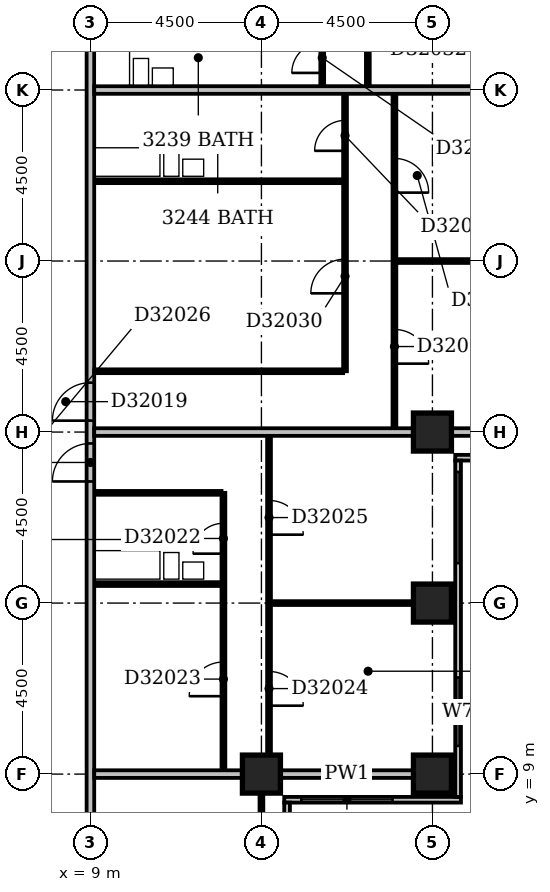
"""IFC4 building model, lengths in metres.
Left out: names, types, materials, properties, quantities, classifications, styles, units other than length and angle.
Written with IfcOpenShell. Run it as: python <this file> out.ifc"""

import sys

from ifc_helpers import new_model, si_unit, direction, frame, frame_2d, origin, origin_2d, place, context, subcontext, project, spatial, rectangle, extrude, element, fill, save


model = new_model("IFC4")
c1 = context("Model", 3, precision=1e-05, world=origin(), true_north=direction((0.0, 1.0)))
c2 = subcontext(c1, "Body", "Model", "MODEL_VIEW")
j1 = project(units=[si_unit("LENGTHUNIT", "METRE"), si_unit("PLANEANGLEUNIT", "RADIAN")], contexts=[c1])
p1 = place(None, origin())
s1 = spatial("IfcSite", under=j1, at=p1, CompositionType="ELEMENT")
p2 = place(p1, origin())
s2 = spatial("IfcBuilding", under=s1, at=p2, CompositionType="ELEMENT")
p3 = place(p2, frame((0.0, 0.0, 130.4)))
s3 = spatial("IfcBuildingStorey", under=s2, at=p3, CompositionType="ELEMENT", Elevation=130.4)
for number, where, z_axis, x_axis in (
    (1, (13.5, 9.0, -0.3), (0.0, 0.0, 1.0), (1.0, 0.0, 0.0)),
    (2, (18.0, 9.0, -0.3), (0.0, 0.0, 1.0), (1.0, 0.0, 0.0)),
    (3, (18.0, 13.5, -0.3), (0.0, 0.0, 1.0), (1.0, 0.0, 0.0)),
    (4, (18.0, 18.0, -0.3), (0.0, 0.0, 1.0), (1.0, 0.0, 0.0)),
):
    element("IfcColumn", number, at=place(p3, frame(where, z_axis=z_axis, x_axis=x_axis)), inside=s3, PredefinedType="COLUMN", context=c2, shape_type="SweptSolid", body=[
        extrude(rectangle(XDim=1.0, YDim=1.0, at=origin_2d()), origin(), (0.0, 0.0, 1.0), 3.6),
    ])
p4 = place(p3, frame((14.175, 3.9, 0.0), z_axis=(0.0, 0.0, 1.0), x_axis=(0.0, 1.0, 0.0)))
e5 = element("IfcWall", 5, at=p4, inside=s3, PredefinedType="STANDARD", context=c2, shape_type="SweptSolid", body=[
    extrude(rectangle(XDim=4.35, YDim=0.15, at=frame_2d((2.175, 0.0))), origin(), (0.0, 0.0, 1.0), 2.7),
])
p5 = place(p4, frame((1.65, 0.0, 0.6)))
e6 = element("IfcOpeningElement", 6, at=p5, cuts=e5, PredefinedType="OPENING", context=c2, shape_type="SweptSolid", body=[
    extrude(rectangle(XDim=2.4, YDim=1.8, at=frame_2d((1.2, 0.9))), frame((0.0, 0.087, 0.0), z_axis=(0.0, -1.0, 0.0), x_axis=(1.0, 0.0, 0.0)), (0.0, 0.0, 1.0), 0.174),
])
p6 = place(p3, frame((14.1, 8.325, 0.0), z_axis=(0.0, 0.0, 1.0), x_axis=(1.0, 0.0, 0.0)))
e7 = element("IfcWall", 7, at=p6, inside=s3, PredefinedType="STANDARD", context=c2, shape_type="SweptSolid", body=[
    extrude(rectangle(XDim=4.65, YDim=0.15, at=frame_2d((2.325, 0.0))), origin(), (0.0, 0.0, 1.0), 2.7),
])
p7 = place(p6, frame((0.45, 0.0, 0.6)))
e8 = element("IfcOpeningElement", 8, at=p7, cuts=e7, PredefinedType="OPENING", context=c2, shape_type="SweptSolid", body=[
    extrude(rectangle(XDim=2.4, YDim=1.8, at=frame_2d((1.2, 0.9))), frame((0.0, 0.087, 0.0), z_axis=(0.0, -1.0, 0.0), x_axis=(1.0, 0.0, 0.0)), (0.0, 0.0, 1.0), 0.174),
])
p8 = place(p3, frame((18.675, 8.4, 0.0), z_axis=(0.0, 0.0, 1.0), x_axis=(0.0, 1.0, 0.0)))
e9 = element("IfcWall", 9, at=p8, inside=s3, PredefinedType="STANDARD", context=c2, shape_type="SweptSolid", body=[
    extrude(rectangle(XDim=8.85, YDim=0.15, at=frame_2d((4.425, 0.0))), origin(), (0.0, 0.0, 1.0), 2.7),
])
p9 = place(p8, frame((1.342, 0.0, 0.6)))
e10 = element("IfcOpeningElement", 10, at=p9, cuts=e9, PredefinedType="OPENING", context=c2, shape_type="SweptSolid", body=[
    extrude(rectangle(XDim=1.8, YDim=1.8, at=frame_2d((0.9, 0.9))), frame((0.0, 0.087, 0.0), z_axis=(0.0, -1.0, 0.0), x_axis=(1.0, 0.0, 0.0)), (0.0, 0.0, 1.0), 0.174),
])
p10 = place(p8, frame((6.15, 0.0, 0.6)))
e11 = element("IfcOpeningElement", 11, at=p10, cuts=e9, PredefinedType="OPENING", context=c2, shape_type="SweptSolid", body=[
    extrude(rectangle(XDim=2.4, YDim=1.8, at=frame_2d((1.2, 0.9))), frame((0.0, 0.087, 0.0), z_axis=(0.0, -1.0, 0.0), x_axis=(1.0, 0.0, 0.0)), (0.0, 0.0, 1.0), 0.174),
])
p11 = place(p3, frame((18.6, 17.325, 0.0), z_axis=(0.0, 0.0, 1.0), x_axis=(1.0, 0.0, 0.0)))
e12 = element("IfcWall", 12, at=p11, inside=s3, PredefinedType="STANDARD", context=c2, shape_type="SweptSolid", body=[
    extrude(rectangle(XDim=4.65, YDim=0.15, at=frame_2d((2.325, 0.0))), origin(), (0.0, 0.0, 1.0), 2.7),
])
p12 = place(p11, frame((0.45, 0.0, 0.6)))
e13 = element("IfcOpeningElement", 13, at=p12, cuts=e12, PredefinedType="OPENING", context=c2, shape_type="SweptSolid", body=[
    extrude(rectangle(XDim=2.4, YDim=1.8, at=frame_2d((1.2, 0.9))), frame((0.0, 0.087, 0.0), z_axis=(0.0, -1.0, 0.0), x_axis=(1.0, 0.0, 0.0)), (0.0, 0.0, 1.0), 0.174),
])
p13 = place(p3, frame((9.0, 5.0, 0.0), z_axis=(0.0, 0.0, 1.0), x_axis=(0.0, 1.0, 0.0)))
e14 = element("IfcWall", 14, at=p13, inside=s3, PredefinedType="PARTITIONING", context=c2, shape_type="SweptSolid", body=[
    extrude(rectangle(XDim=27.75, YDim=0.2, at=frame_2d((13.875, 0.0))), origin(), (0.0, 0.0, 1.0), 3.3),
])
p14 = place(p13, frame((23.95, 0.0, 0.0)))
e15 = element("IfcOpeningElement", 15, at=p14, cuts=e14, PredefinedType="OPENING", context=c2, shape_type="SweptSolid", body=[
    extrude(rectangle(XDim=1.0, YDim=2.1, at=frame_2d((0.5, 1.05))), frame((0.0, 0.112, 0.0), z_axis=(0.0, -1.0, 0.0), x_axis=(1.0, 0.0, 0.0)), (0.0, 0.0, 1.0), 0.224),
])
p15 = place(p13, frame((13.3, 0.0, 0.0)))
e16 = element("IfcOpeningElement", 16, at=p15, cuts=e14, PredefinedType="OPENING", context=c2, shape_type="SweptSolid", body=[
    extrude(rectangle(XDim=1.0, YDim=2.1, at=frame_2d((0.5, 1.05))), frame((0.0, 0.112, 0.0), z_axis=(0.0, -1.0, 0.0), x_axis=(1.0, 0.0, 0.0)), (0.0, 0.0, 1.0), 0.224),
])
p16 = place(p13, frame((11.7, 0.0, 0.0)))
e17 = element("IfcOpeningElement", 17, at=p16, cuts=e14, PredefinedType="OPENING", context=c2, shape_type="SweptSolid", body=[
    extrude(rectangle(XDim=1.0, YDim=2.1, at=frame_2d((0.5, 1.05))), frame((0.0, 0.112, 0.0), z_axis=(0.0, -1.0, 0.0), x_axis=(1.0, 0.0, 0.0)), (0.0, 0.0, 1.0), 0.224),
])
p17 = place(p13, frame((1.5, 0.0, 0.0)))
e18 = element("IfcOpeningElement", 18, at=p17, cuts=e14, PredefinedType="OPENING", context=c2, shape_type="SweptSolid", body=[
    extrude(rectangle(XDim=0.9, YDim=2.1, at=frame_2d((0.45, 1.05))), frame((0.0, 0.112, 0.0), z_axis=(0.0, -1.0, 0.0), x_axis=(1.0, 0.0, 0.0)), (0.0, 0.0, 1.0), 0.224),
])
p18 = place(p3, frame((13.5, 5.0, 0.0), z_axis=(0.0, 0.0, 1.0), x_axis=(0.0, 1.0, 0.0)))
e19 = element("IfcWall", 19, at=p18, inside=s3, PredefinedType="PARTITIONING", context=c2, shape_type="SweptSolid", body=[
    extrude(rectangle(XDim=3.5, YDim=0.1, at=frame_2d((1.75, 0.0))), origin(), (0.0, 0.0, 1.0), 2.7),
])
p19 = place(p3, frame((9.1, 9.0, 0.0), z_axis=(0.0, 0.0, 1.0), x_axis=(1.0, 0.0, 0.0)))
e20 = element("IfcWall", 20, at=p19, inside=s3, PredefinedType="PARTITIONING", context=c2, shape_type="SweptSolid", body=[
    extrude(rectangle(XDim=3.9, YDim=0.2, at=frame_2d((1.95, 0.0))), origin(), (0.0, 0.0, 1.0), 3.3),
])
p20 = place(p3, frame((14.0, 9.0, 0.0), z_axis=(0.0, 0.0, 1.0), x_axis=(1.0, 0.0, 0.0)))
e21 = element("IfcWall", 21, at=p20, inside=s3, PredefinedType="PARTITIONING", context=c2, shape_type="SweptSolid", body=[
    extrude(rectangle(XDim=3.5, YDim=0.2, at=frame_2d((1.75, 0.0))), origin(), (0.0, 0.0, 1.0), 2.7),
])
p21 = place(p3, frame((12.5, 9.1, 0.0), z_axis=(0.0, 0.0, 1.0), x_axis=(0.0, 1.0, 0.0)))
e22 = element("IfcWall", 22, at=p21, inside=s3, PredefinedType="PARTITIONING", context=c2, shape_type="SweptSolid", body=[
    extrude(rectangle(XDim=7.3, YDim=0.1, at=frame_2d((3.65, 0.0))), origin(), (0.0, 0.0, 1.0), 3.3),
])
p22 = place(p21, frame((5.7, 0.0, 0.0)))
e23 = element("IfcOpeningElement", 23, at=p22, cuts=e22, PredefinedType="OPENING", context=c2, shape_type="SweptSolid", body=[
    extrude(rectangle(XDim=0.8, YDim=2.1, at=frame_2d((0.4, 1.05))), frame((0.0, 0.062, 0.0), z_axis=(0.0, -1.0, 0.0), x_axis=(1.0, 0.0, 0.0)), (0.0, 0.0, 1.0), 0.124),
])
p23 = place(p21, frame((1.95, 0.0, 0.0)))
e24 = element("IfcOpeningElement", 24, at=p23, cuts=e22, PredefinedType="OPENING", context=c2, shape_type="SweptSolid", body=[
    extrude(rectangle(XDim=0.9, YDim=2.1, at=frame_2d((0.45, 1.05))), frame((0.0, 0.062, 0.0), z_axis=(0.0, -1.0, 0.0), x_axis=(1.0, 0.0, 0.0)), (0.0, 0.0, 1.0), 0.124),
])
p24 = place(p3, frame((13.7, 9.5, 0.0), z_axis=(0.0, 0.0, 1.0), x_axis=(0.0, 1.0, 0.0)))
e25 = element("IfcWall", 25, at=p24, inside=s3, PredefinedType="PARTITIONING", context=c2, shape_type="SweptSolid", body=[
    extrude(rectangle(XDim=8.4, YDim=0.1, at=frame_2d((4.2, 0.0))), origin(), (0.0, 0.0, 1.0), 3.3),
])
p25 = place(p24, frame((1.3, 0.0, 0.0)))
e26 = element("IfcOpeningElement", 26, at=p25, cuts=e25, PredefinedType="OPENING", context=c2, shape_type="SweptSolid", body=[
    extrude(rectangle(XDim=0.9, YDim=2.1, at=frame_2d((0.45, 1.05))), frame((0.0, 0.062, 0.0), z_axis=(0.0, -1.0, 0.0), x_axis=(1.0, 0.0, 0.0)), (0.0, 0.0, 1.0), 0.124),
])
p26 = place(p24, frame((5.8, 0.0, 0.0)))
e27 = element("IfcOpeningElement", 27, at=p26, cuts=e25, PredefinedType="OPENING", context=c2, shape_type="SweptSolid", body=[
    extrude(rectangle(XDim=0.9, YDim=2.1, at=frame_2d((0.45, 1.05))), frame((0.0, 0.062, 0.0), z_axis=(0.0, -1.0, 0.0), x_axis=(1.0, 0.0, 0.0)), (0.0, 0.0, 1.0), 0.124),
])
p27 = place(p3, frame((13.75, 13.5, 0.0), z_axis=(0.0, 0.0, 1.0), x_axis=(1.0, 0.0, 0.0)))
e28 = element("IfcWall", 28, at=p27, inside=s3, PredefinedType="PARTITIONING", context=c2, shape_type="SweptSolid", body=[
    extrude(rectangle(XDim=3.75, YDim=0.1, at=frame_2d((1.875, 0.0))), origin(), (0.0, 0.0, 1.0), 3.3),
])
for number, where, z_axis, x_axis in (
    (29, (9.1, 14.0, 0.0), (0.0, 0.0, 1.0), (1.0, 0.0, 0.0)),
    (30, (9.1, 16.4, 0.0), (0.0, 0.0, 1.0), (1.0, 0.0, 0.0)),
):
    element("IfcWall", number, at=place(p3, frame(where, z_axis=z_axis, x_axis=x_axis)), inside=s3, PredefinedType="PLUMBINGWALL", context=c2, shape_type="SweptSolid", body=[
        extrude(rectangle(XDim=3.35, YDim=0.1, at=frame_2d((1.675, 0.0))), origin(), (0.0, 0.0, 1.0), 3.3),
    ])
p28 = place(p3, frame((9.1, 18.0, 0.0), z_axis=(0.0, 0.0, 1.0), x_axis=(1.0, 0.0, 0.0)))
e31 = element("IfcWall", 31, at=p28, inside=s3, PredefinedType="PARTITIONING", context=c2, shape_type="SweptSolid", body=[
    extrude(rectangle(XDim=8.4, YDim=0.2, at=frame_2d((4.2, 0.0))), origin(), (0.0, 0.0, 1.0), 2.6),
])
p29 = place(p3, frame((18.5, 18.0, 0.0), z_axis=(0.0, 0.0, 1.0), x_axis=(1.0, 0.0, 0.0)))
e32 = element("IfcWall", 32, at=p29, inside=s3, PredefinedType="PARTITIONING", context=c2, shape_type="SweptSolid", body=[
    extrude(rectangle(XDim=3.5, YDim=0.2, at=frame_2d((1.75, 0.0))), origin(), (0.0, 0.0, 1.0), 2.7),
])
p30 = place(p3, frame((17.0, 18.1, 0.0), z_axis=(0.0, 0.0, 1.0), x_axis=(0.0, 1.0, 0.0)))
e33 = element("IfcWall", 33, at=p30, inside=s3, PredefinedType="PARTITIONING", context=c2, shape_type="SweptSolid", body=[
    extrude(rectangle(XDim=8.8, YDim=0.1, at=frame_2d((4.4, 0.0))), origin(), (0.0, 0.0, 1.0), 3.3),
])
p31 = place(p30, frame((1.7, 0.0, 0.0)))
e34 = element("IfcOpeningElement", 34, at=p31, cuts=e33, PredefinedType="OPENING", context=c2, shape_type="SweptSolid", body=[
    extrude(rectangle(XDim=0.9, YDim=2.1, at=frame_2d((0.45, 1.05))), frame((0.0, 0.062, 0.0), z_axis=(0.0, -1.0, 0.0), x_axis=(1.0, 0.0, 0.0)), (0.0, 0.0, 1.0), 0.124),
])
p32 = place(p30, frame((6.2, 0.0, 0.0)))
e35 = element("IfcOpeningElement", 35, at=p32, cuts=e33, PredefinedType="OPENING", context=c2, shape_type="SweptSolid", body=[
    extrude(rectangle(XDim=0.9, YDim=2.1, at=frame_2d((0.45, 1.05))), frame((0.0, 0.062, 0.0), z_axis=(0.0, -1.0, 0.0), x_axis=(1.0, 0.0, 0.0)), (0.0, 0.0, 1.0), 0.124),
])
p33 = place(p3, frame((9.1, 19.6, 0.0), z_axis=(0.0, 0.0, 1.0), x_axis=(1.0, 0.0, 0.0)))
e36 = element("IfcWall", 36, at=p33, inside=s3, PredefinedType="PARTITIONING", context=c2, shape_type="SweptSolid", body=[
    extrude(rectangle(XDim=6.55, YDim=0.1, at=frame_2d((3.275, 0.0))), origin(), (0.0, 0.0, 1.0), 3.3),
])
p34 = place(p3, frame((15.7, 19.6, 0.0), z_axis=(0.0, 0.0, 1.0), x_axis=(0.0, 1.0, 0.0)))
e37 = element("IfcWall", 37, at=p34, inside=s3, PredefinedType="PARTITIONING", context=c2, shape_type="SweptSolid", body=[
    extrude(rectangle(XDim=7.3, YDim=0.1, at=frame_2d((3.65, 0.0))), origin(), (0.0, 0.0, 1.0), 3.3),
])
p35 = place(p34, frame((5.8, 0.0, 0.0)))
e38 = element("IfcOpeningElement", 38, at=p35, cuts=e37, PredefinedType="OPENING", context=c2, shape_type="SweptSolid", body=[
    extrude(rectangle(XDim=0.8, YDim=2.1, at=frame_2d((0.4, 1.05))), frame((0.0, 0.062, 0.0), z_axis=(0.0, -1.0, 0.0), x_axis=(1.0, 0.0, 0.0)), (0.0, 0.0, 1.0), 0.124),
])
p36 = place(p34, frame((2.05, 0.0, 0.0)))
e39 = element("IfcOpeningElement", 39, at=p36, cuts=e37, PredefinedType="OPENING", context=c2, shape_type="SweptSolid", body=[
    extrude(rectangle(XDim=0.9, YDim=2.1, at=frame_2d((0.45, 1.05))), frame((0.0, 0.062, 0.0), z_axis=(0.0, -1.0, 0.0), x_axis=(1.0, 0.0, 0.0)), (0.0, 0.0, 1.0), 0.124),
])
p37 = place(p3, frame((17.05, 22.5, 0.0), z_axis=(0.0, 0.0, 1.0), x_axis=(1.0, 0.0, 0.0)))
e40 = element("IfcWall", 40, at=p37, inside=s3, PredefinedType="PARTITIONING", context=c2, shape_type="SweptSolid", body=[
    extrude(rectangle(XDim=4.95, YDim=0.1, at=frame_2d((2.475, 0.0))), origin(), (0.0, 0.0, 1.0), 3.3),
])
p38 = place(p3, frame((9.1, 24.6, 0.0), z_axis=(0.0, 0.0, 1.0), x_axis=(1.0, 0.0, 0.0)))
e41 = element("IfcWall", 41, at=p38, inside=s3, PredefinedType="PLUMBINGWALL", context=c2, shape_type="SweptSolid", body=[
    extrude(rectangle(XDim=6.55, YDim=0.1, at=frame_2d((3.275, 0.0))), origin(), (0.0, 0.0, 1.0), 3.3),
])
p39 = place(p3, frame((9.1, 27.0, 0.0), z_axis=(0.0, 0.0, 1.0), x_axis=(1.0, 0.0, 0.0)))
e42 = element("IfcWall", 42, at=p39, inside=s3, PredefinedType="PARTITIONING", context=c2, shape_type="SweptSolid", body=[
    extrude(rectangle(XDim=12.9, YDim=0.2, at=frame_2d((6.45, 0.0))), origin(), (0.0, 0.0, 1.0), 2.7),
])
p40 = place(p3, frame((15.1, 27.1, 0.0), z_axis=(0.0, 0.0, 1.0), x_axis=(0.0, 1.0, 0.0)))
e43 = element("IfcWall", 43, at=p40, inside=s3, PredefinedType="PARTITIONING", context=c2, shape_type="SweptSolid", body=[
    extrude(rectangle(XDim=1.6, YDim=0.1, at=frame_2d((0.8, 0.0))), origin(), (0.0, 0.0, 1.0), 3.3),
])
p41 = place(p40, frame((0.35, 0.0, 0.0)))
e44 = element("IfcOpeningElement", 44, at=p41, cuts=e43, PredefinedType="OPENING", context=c2, shape_type="SweptSolid", body=[
    extrude(rectangle(XDim=0.8, YDim=2.1, at=frame_2d((0.4, 1.05))), frame((0.0, 0.062, 0.0), z_axis=(0.0, -1.0, 0.0), x_axis=(1.0, 0.0, 0.0)), (0.0, 0.0, 1.0), 0.124),
])
p42 = place(p3, frame((16.3, 27.1, 0.0), z_axis=(0.0, 0.0, 1.0), x_axis=(0.0, 1.0, 0.0)))
e45 = element("IfcWall", 45, at=p42, inside=s3, PredefinedType="PARTITIONING", context=c2, shape_type="SweptSolid", body=[
    extrude(rectangle(XDim=4.3, YDim=0.1, at=frame_2d((2.15, 0.0))), origin(), (0.0, 0.0, 1.0), 3.3),
])
p43 = place(p42, frame((1.7, 0.0, 0.0)))
e46 = element("IfcOpeningElement", 46, at=p43, cuts=e45, PredefinedType="OPENING", context=c2, shape_type="SweptSolid", body=[
    extrude(rectangle(XDim=0.9, YDim=2.1, at=frame_2d((0.45, 1.05))), frame((0.0, 0.062, 0.0), z_axis=(0.0, -1.0, 0.0), x_axis=(1.0, 0.0, 0.0)), (0.0, 0.0, 1.0), 0.124),
])
p44 = place(p7, origin())
e47 = element("IfcWindow", 47, at=p44, inside=s3, PartitioningType="SINGLE_PANEL", PredefinedType="WINDOW", context=c2, shape_type="SweptSolid", body=[
    extrude(rectangle(XDim=2.4, YDim=1.8, at=frame_2d((1.2, 0.9))), frame((0.0, 0.03, 0.0), z_axis=(0.0, -1.0, 0.0), x_axis=(1.0, 0.0, 0.0)), (0.0, 0.0, 1.0), 0.06),
])
fill(e8, e47)
p45 = place(p9, origin())
e48 = element("IfcWindow", 48, at=p45, inside=s3, PartitioningType="SINGLE_PANEL", PredefinedType="WINDOW", context=c2, shape_type="SweptSolid", body=[
    extrude(rectangle(XDim=1.8, YDim=1.8, at=frame_2d((0.9, 0.9))), frame((0.0, 0.03, 0.0), z_axis=(0.0, -1.0, 0.0), x_axis=(1.0, 0.0, 0.0)), (0.0, 0.0, 1.0), 0.06),
])
fill(e10, e48)
p46 = place(p10, origin())
e49 = element("IfcWindow", 49, at=p46, inside=s3, PartitioningType="SINGLE_PANEL", PredefinedType="WINDOW", context=c2, shape_type="SweptSolid", body=[
    extrude(rectangle(XDim=2.4, YDim=1.8, at=frame_2d((1.2, 0.9))), frame((0.0, 0.03, 0.0), z_axis=(0.0, -1.0, 0.0), x_axis=(1.0, 0.0, 0.0)), (0.0, 0.0, 1.0), 0.06),
])
fill(e11, e49)
p47 = place(p15, origin())
e50 = element("IfcDoor", 50, at=p47, inside=s3, OperationType="SINGLE_SWING_LEFT", PredefinedType="DOOR", context=c2, shape_type="SweptSolid", body=[
    extrude(rectangle(XDim=1.0, YDim=2.1, at=frame_2d((0.5, 1.05))), frame((0.0, 0.025, 0.0), z_axis=(0.0, -1.0, 0.0), x_axis=(1.0, 0.0, 0.0)), (0.0, 0.0, 1.0), 0.05),
])
fill(e16, e50)
p48 = place(p16, origin())
e51 = element("IfcDoor", 51, at=p48, inside=s3, OperationType="SINGLE_SWING_LEFT", PredefinedType="DOOR", context=c2, shape_type="SweptSolid", body=[
    extrude(rectangle(XDim=1.0, YDim=2.1, at=frame_2d((0.5, 1.05))), frame((0.0, 0.025, 0.0), z_axis=(0.0, -1.0, 0.0), x_axis=(1.0, 0.0, 0.0)), (0.0, 0.0, 1.0), 0.05),
])
fill(e17, e51)
p49 = place(p22, origin())
e52 = element("IfcDoor", 52, at=p49, inside=s3, OperationType="SINGLE_SWING_LEFT", PredefinedType="DOOR", context=c2, shape_type="SweptSolid", body=[
    extrude(rectangle(XDim=0.8, YDim=2.1, at=frame_2d((0.4, 1.05))), frame((0.0, 0.025, 0.0), z_axis=(0.0, -1.0, 0.0), x_axis=(1.0, 0.0, 0.0)), (0.0, 0.0, 1.0), 0.05),
])
fill(e23, e52)
p50 = place(p23, origin())
e53 = element("IfcDoor", 53, at=p50, inside=s3, OperationType="SINGLE_SWING_LEFT", PredefinedType="DOOR", context=c2, shape_type="SweptSolid", body=[
    extrude(rectangle(XDim=0.9, YDim=2.1, at=frame_2d((0.45, 1.05))), frame((0.0, 0.025, 0.0), z_axis=(0.0, -1.0, 0.0), x_axis=(1.0, 0.0, 0.0)), (0.0, 0.0, 1.0), 0.05),
])
fill(e24, e53)
p51 = place(p25, frame((0.9, 0.0, 0.0), z_axis=(0.0, 0.0, 1.0), x_axis=(-1.0, 0.0, 0.0)))
e54 = element("IfcDoor", 54, at=p51, inside=s3, OperationType="SINGLE_SWING_RIGHT", PredefinedType="DOOR", context=c2, shape_type="SweptSolid", body=[
    extrude(rectangle(XDim=0.9, YDim=2.1, at=frame_2d((0.45, 1.05))), frame((0.0, 0.025, 0.0), z_axis=(0.0, -1.0, 0.0), x_axis=(1.0, 0.0, 0.0)), (0.0, 0.0, 1.0), 0.05),
])
fill(e26, e54)
p52 = place(p26, frame((0.9, 0.0, 0.0), z_axis=(0.0, 0.0, 1.0), x_axis=(-1.0, 0.0, 0.0)))
e55 = element("IfcDoor", 55, at=p52, inside=s3, OperationType="SINGLE_SWING_RIGHT", PredefinedType="DOOR", context=c2, shape_type="SweptSolid", body=[
    extrude(rectangle(XDim=0.9, YDim=2.1, at=frame_2d((0.45, 1.05))), frame((0.0, 0.025, 0.0), z_axis=(0.0, -1.0, 0.0), x_axis=(1.0, 0.0, 0.0)), (0.0, 0.0, 1.0), 0.05),
])
fill(e27, e55)
p53 = place(p31, frame((0.9, 0.0, 0.0), z_axis=(0.0, 0.0, 1.0), x_axis=(-1.0, 0.0, 0.0)))
e56 = element("IfcDoor", 56, at=p53, inside=s3, OperationType="SINGLE_SWING_RIGHT", PredefinedType="DOOR", context=c2, shape_type="SweptSolid", body=[
    extrude(rectangle(XDim=0.9, YDim=2.1, at=frame_2d((0.45, 1.05))), frame((0.0, 0.025, 0.0), z_axis=(0.0, -1.0, 0.0), x_axis=(1.0, 0.0, 0.0)), (0.0, 0.0, 1.0), 0.05),
])
fill(e34, e56)
p54 = place(p32, frame((0.9, 0.0, 0.0), z_axis=(0.0, 0.0, 1.0), x_axis=(-1.0, 0.0, 0.0)))
e57 = element("IfcDoor", 57, at=p54, inside=s3, OperationType="SINGLE_SWING_RIGHT", PredefinedType="DOOR", context=c2, shape_type="SweptSolid", body=[
    extrude(rectangle(XDim=0.9, YDim=2.1, at=frame_2d((0.45, 1.05))), frame((0.0, 0.025, 0.0), z_axis=(0.0, -1.0, 0.0), x_axis=(1.0, 0.0, 0.0)), (0.0, 0.0, 1.0), 0.05),
])
fill(e35, e57)
p55 = place(p35, origin())
e58 = element("IfcDoor", 58, at=p55, inside=s3, OperationType="SINGLE_SWING_LEFT", PredefinedType="DOOR", context=c2, shape_type="SweptSolid", body=[
    extrude(rectangle(XDim=0.8, YDim=2.1, at=frame_2d((0.4, 1.05))), frame((0.0, 0.025, 0.0), z_axis=(0.0, -1.0, 0.0), x_axis=(1.0, 0.0, 0.0)), (0.0, 0.0, 1.0), 0.05),
])
fill(e38, e58)
p56 = place(p36, origin())
e59 = element("IfcDoor", 59, at=p56, inside=s3, OperationType="SINGLE_SWING_LEFT", PredefinedType="DOOR", context=c2, shape_type="SweptSolid", body=[
    extrude(rectangle(XDim=0.9, YDim=2.1, at=frame_2d((0.45, 1.05))), frame((0.0, 0.025, 0.0), z_axis=(0.0, -1.0, 0.0), x_axis=(1.0, 0.0, 0.0)), (0.0, 0.0, 1.0), 0.05),
])
fill(e39, e59)
p57 = place(p41, origin())
e60 = element("IfcDoor", 60, at=p57, inside=s3, OperationType="SINGLE_SWING_LEFT", PredefinedType="DOOR", context=c2, shape_type="SweptSolid", body=[
    extrude(rectangle(XDim=0.8, YDim=2.1, at=frame_2d((0.4, 1.05))), frame((0.0, 0.025, 0.0), z_axis=(0.0, -1.0, 0.0), x_axis=(1.0, 0.0, 0.0)), (0.0, 0.0, 1.0), 0.05),
])
fill(e44, e60)
save(model, sys.argv[1])
